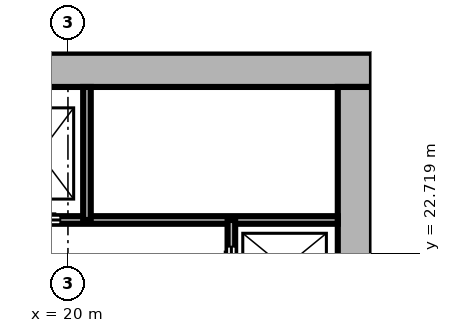
"""IFC4 building model, lengths in metres.
Left out: names, types, materials, properties, quantities, classifications, styles, units other than length and angle.
Written with IfcOpenShell. Run it as: python <this file> out.ifc"""

import sys

from ifc_helpers import new_model, si_unit, direction, frame, frame_2d, origin, place, context, subcontext, project, spatial, rectangle, extrude, element, fill, save


model = new_model("IFC4")
c1 = context("Model", 3, precision=1e-05, world=origin(), true_north=direction((0.0, 1.0)))
c2 = subcontext(c1, "Body", "Model", "MODEL_VIEW")
j1 = project(units=[si_unit("LENGTHUNIT", "METRE"), si_unit("PLANEANGLEUNIT", "RADIAN")], contexts=[c1])
p1 = place(None, origin())
s1 = spatial("IfcSite", under=j1, at=p1, CompositionType="ELEMENT")
p2 = place(p1, origin())
s2 = spatial("IfcBuilding", under=s1, at=p2, CompositionType="ELEMENT")
p3 = place(p2, frame((0.0, 0.0, 117.3)))
s3 = spatial("IfcBuildingStorey", under=s2, at=p3, CompositionType="ELEMENT", Elevation=117.3)
p4 = place(p3, frame((27.55, 8.9, 0.0), z_axis=(0.0, 0.0, 1.0), x_axis=(0.0, 1.0, 0.0)))
e1 = element("IfcWall", 1, at=p4, inside=s3, PredefinedType="SHEAR", context=c2, shape_type="SweptSolid", body=[
    extrude(rectangle(XDim=18.2, YDim=0.9, at=frame_2d((9.1, 0.0))), origin(), (0.0, 0.0, 1.0), 9.0),
])
p5 = place(p4, frame((4.55, 0.0, 0.0)))
e2 = element("IfcOpeningElement", 2, at=p5, cuts=e1, PredefinedType="OPENING", context=c2, shape_type="SweptSolid", body=[
    extrude(rectangle(XDim=1.6, YDim=2.1, at=frame_2d((0.8, 1.05))), frame((0.0, 0.46, 0.0), z_axis=(0.0, -1.0, 0.0), x_axis=(1.0, 0.0, 0.0)), (0.0, 0.0, 1.0), 0.92),
])
p6 = place(p3, frame((28.0, 27.55, 0.0), z_axis=(0.0, 0.0, 1.0), x_axis=(-1.0, 0.0, 0.0)))
e3 = element("IfcWall", 3, at=p6, inside=s3, PredefinedType="SHEAR", context=c2, shape_type="SweptSolid", body=[
    extrude(rectangle(XDim=20.0, YDim=0.9, at=frame_2d((10.0, 0.0))), origin(), (0.0, 0.0, 1.0), 9.0),
])
p7 = place(p3, frame((13.8, 23.6, 0.0), z_axis=(0.0, 0.0, 1.0), x_axis=(1.0, 0.0, 0.0)))
e4 = element("IfcWall", 4, at=p7, inside=s3, PredefinedType="SHEAR", context=c2, shape_type="SweptSolid", body=[
    extrude(rectangle(XDim=13.3, YDim=0.2, at=frame_2d((6.65, 0.0))), origin(), (0.0, 0.0, 1.0), 8.55),
])
p8 = place(p7, frame((2.4, 0.0, 0.0)))
e5 = element("IfcOpeningElement", 5, at=p8, cuts=e4, PredefinedType="OPENING", context=c2, shape_type="SweptSolid", body=[
    extrude(rectangle(XDim=1.1, YDim=2.1, at=frame_2d((0.55, 1.05))), frame((0.0, 0.11, 0.0), z_axis=(0.0, -1.0, 0.0), x_axis=(1.0, 0.0, 0.0)), (0.0, 0.0, 1.0), 0.22),
])
p9 = place(p7, frame((4.9, 0.0, 0.0)))
e6 = element("IfcOpeningElement", 6, at=p9, cuts=e4, PredefinedType="OPENING", context=c2, shape_type="SweptSolid", body=[
    extrude(rectangle(XDim=1.1, YDim=2.1, at=frame_2d((0.55, 1.05))), frame((0.0, 0.11, 0.0), z_axis=(0.0, -1.0, 0.0), x_axis=(1.0, 0.0, 0.0)), (0.0, 0.0, 1.0), 0.22),
])
p10 = place(p7, frame((0.25, 0.0, 0.0)))
e7 = element("IfcOpeningElement", 7, at=p10, cuts=e4, PredefinedType="OPENING", context=c2, shape_type="SweptSolid", body=[
    extrude(rectangle(XDim=1.0, YDim=2.1, at=frame_2d((0.5, 1.05))), frame((0.0, 0.11, 0.0), z_axis=(0.0, -1.0, 0.0), x_axis=(1.0, 0.0, 0.0)), (0.0, 0.0, 1.0), 0.22),
])
p11 = place(p3, frame((20.5, 23.6, 0.0), z_axis=(0.0, 0.0, 1.0), x_axis=(0.0, 1.0, 0.0)))
e8 = element("IfcWall", 8, at=p11, inside=s3, PredefinedType="SHEAR", context=c2, shape_type="SweptSolid", body=[
    extrude(rectangle(XDim=3.5, YDim=0.2, at=frame_2d((1.75, 0.0))), origin(), (0.0, 0.0, 1.0), 8.55),
])
p12 = place(p3, frame((24.3, 16.1, 0.0), z_axis=(0.0, 0.0, 1.0), x_axis=(0.0, 1.0, 0.0)))
e9 = element("IfcWall", 9, at=p12, inside=s3, PredefinedType="SHEAR", context=c2, shape_type="SweptSolid", body=[
    extrude(rectangle(XDim=7.5, YDim=0.2, at=frame_2d((3.75, 0.0))), origin(), (0.0, 0.0, 1.0), 8.55),
])
p13 = place(p12, frame((5.7, 0.0, 0.0)))
e10 = element("IfcOpeningElement", 10, at=p13, cuts=e9, PredefinedType="OPENING", context=c2, shape_type="SweptSolid", body=[
    extrude(rectangle(XDim=1.1, YDim=2.1, at=frame_2d((0.55, 1.05))), frame((0.0, 0.11, 0.0), z_axis=(0.0, -1.0, 0.0), x_axis=(1.0, 0.0, 0.0)), (0.0, 0.0, 1.0), 0.22),
])
p14 = place(p13, origin())
e11 = element("IfcDoor", 11, at=p14, inside=s3, OperationType="DOUBLE_DOOR_SLIDING", PredefinedType="DOOR", context=c2, shape_type="SweptSolid", body=[
    extrude(rectangle(XDim=1.1, YDim=2.1, at=frame_2d((0.55, 1.05))), frame((0.0, 0.025, 0.0), z_axis=(0.0, -1.0, 0.0), x_axis=(1.0, 0.0, 0.0)), (0.0, 0.0, 1.0), 0.05),
])
fill(e10, e11)
p15 = place(p9, origin())
e12 = element("IfcDoor", 12, at=p15, inside=s3, OperationType="DOUBLE_DOOR_SLIDING", PredefinedType="DOOR", context=c2, shape_type="SweptSolid", body=[
    extrude(rectangle(XDim=1.1, YDim=2.1, at=frame_2d((0.55, 1.05))), frame((0.0, 0.025, 0.0), z_axis=(0.0, -1.0, 0.0), x_axis=(1.0, 0.0, 0.0)), (0.0, 0.0, 1.0), 0.05),
])
fill(e6, e12)
save(model, sys.argv[1])
